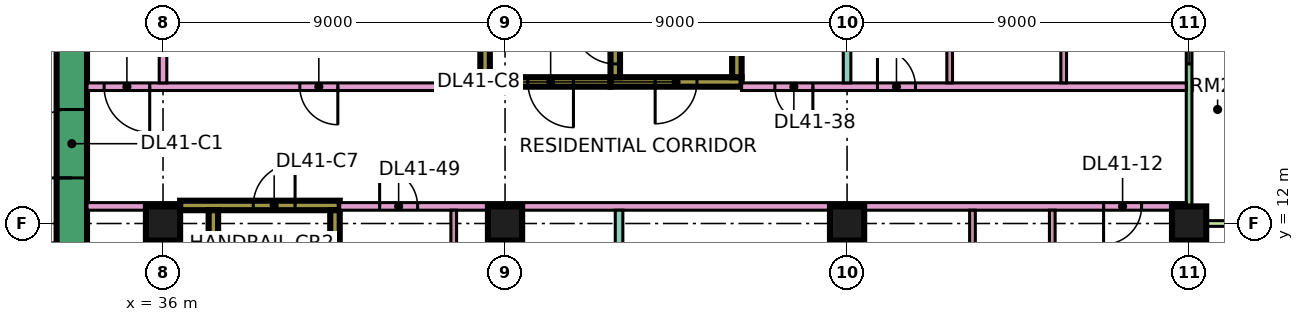
"""IFC4 building model, lengths in metres.
Left out: names, types, materials, properties, quantities, classifications, styles, units other than length and angle.
Written with IfcOpenShell. Run it as: python <this file> out.ifc"""

import sys

from ifc_helpers import new_model, si_unit, direction, frame, frame_2d, origin, origin_2d, place, context, subcontext, project, spatial, rectangle, extrude, element, fill, save


model = new_model("IFC4")
c1 = context("Model", 3, precision=1e-05, world=origin(), true_north=direction((0.0, 1.0)))
c2 = subcontext(c1, "Body", "Model", "MODEL_VIEW")
j1 = project(units=[si_unit("LENGTHUNIT", "METRE"), si_unit("PLANEANGLEUNIT", "RADIAN")], contexts=[c1])
p1 = place(None, origin())
s1 = spatial("IfcSite", under=j1, at=p1, CompositionType="ELEMENT")
p2 = place(p1, origin())
s2 = spatial("IfcBuilding", under=s1, at=p2, CompositionType="ELEMENT")
p3 = place(p2, frame((0.0, 0.0, 179.9)))
s3 = spatial("IfcBuildingStorey", under=s2, at=p3, CompositionType="ELEMENT", Elevation=179.9)
for number, where, z_axis, x_axis in (
    (1, (36.0, 12.0, 0.0), (0.0, 0.0, 1.0), (1.0, 0.0, 0.0)),
    (2, (45.0, 12.0, 0.0), (0.0, 0.0, 1.0), (1.0, 0.0, 0.0)),
    (3, (54.0, 12.0, 0.0), (0.0, 0.0, 1.0), (1.0, 0.0, 0.0)),
    (4, (63.0, 12.0, 0.0), (0.0, 0.0, 1.0), (1.0, 0.0, 0.0)),
):
    element("IfcColumn", number, at=place(p3, frame(where, z_axis=z_axis, x_axis=x_axis)), inside=s3, PredefinedType="COLUMN", context=c2, shape_type="SweptSolid", body=[
        extrude(rectangle(XDim=0.9, YDim=0.9, at=origin_2d()), origin(), (0.0, 0.0, 1.0), 3.75),
    ])
p4 = place(p3, frame((33.6, 7.8, 0.0), z_axis=(0.0, 0.0, 1.0), x_axis=(0.0, 1.0, 0.0)))
e5 = element("IfcWall", 5, at=p4, inside=s3, PredefinedType="SHEAR", context=c2, shape_type="SweptSolid", body=[
    extrude(rectangle(XDim=11.4, YDim=0.8, at=frame_2d((5.7, 0.0))), origin(), (0.0, 0.0, 1.0), 3.75),
])
p5 = place(p4, frame((5.4, 0.0, 0.0)))
e6 = element("IfcOpeningElement", 6, at=p5, cuts=e5, PredefinedType="OPENING", context=c2, shape_type="SweptSolid", body=[
    extrude(rectangle(XDim=1.8, YDim=2.4, at=frame_2d((0.9, 1.2))), frame((0.0, 0.41, 0.0), z_axis=(0.0, -1.0, 0.0), x_axis=(1.0, 0.0, 0.0)), (0.0, 0.0, 1.0), 0.82),
])
p6 = place(p3, frame((36.45, 12.475, 0.0), z_axis=(0.0, 0.0, 1.0), x_axis=(1.0, 0.0, 0.0)))
e7 = element("IfcWall", 7, at=p6, inside=s3, PredefinedType="SHEAR", context=c2, shape_type="SweptSolid", body=[
    extrude(rectangle(XDim=4.2, YDim=0.25, at=frame_2d((2.1, 0.0))), origin(), (0.0, 0.0, 1.0), 3.75),
])
p7 = place(p6, frame((1.925, 0.0, 0.0)))
e8 = element("IfcOpeningElement", 8, at=p7, cuts=e7, PredefinedType="OPENING", context=c2, shape_type="SweptSolid", body=[
    extrude(rectangle(XDim=1.1, YDim=2.2, at=frame_2d((0.55, 1.1))), frame((0.0, 0.135, 0.0), z_axis=(0.0, -1.0, 0.0), x_axis=(1.0, 0.0, 0.0)), (0.0, 0.0, 1.0), 0.27),
])
for number, where, z_axis, x_axis in (
    (9, (37.325, 5.85, 0.0), (0.0, 0.0, 1.0), (0.0, 1.0, 0.0)),
    (10, (40.525, 5.85, 0.0), (0.0, 0.0, 1.0), (0.0, 1.0, 0.0)),
):
    element("IfcWall", number, at=place(p3, frame(where, z_axis=z_axis, x_axis=x_axis)), inside=s3, PredefinedType="SHEAR", context=c2, shape_type="SweptSolid", body=[
        extrude(rectangle(XDim=6.5, YDim=0.25, at=frame_2d((3.25, 0.0))), origin(), (0.0, 0.0, 1.0), 3.75),
    ])
p8 = place(p3, frame((47.775, 15.725, 0.0), z_axis=(0.0, 0.0, 1.0), x_axis=(1.0, 0.0, 0.0)))
e11 = element("IfcWall", 11, at=p8, inside=s3, PredefinedType="SHEAR", context=c2, shape_type="SweptSolid", body=[
    extrude(rectangle(XDim=3.45, YDim=0.25, at=frame_2d((1.725, 0.0))), origin(), (0.0, 0.0, 1.0), 3.75),
])
p9 = place(p8, frame((1.175, 0.0, 0.0)))
e12 = element("IfcOpeningElement", 12, at=p9, cuts=e11, PredefinedType="OPENING", context=c2, shape_type="SweptSolid", body=[
    extrude(rectangle(XDim=1.1, YDim=2.2, at=frame_2d((0.55, 1.1))), frame((0.0, 0.135, 0.0), z_axis=(0.0, -1.0, 0.0), x_axis=(1.0, 0.0, 0.0)), (0.0, 0.0, 1.0), 0.27),
])
p10 = place(p3, frame((47.9, 15.85, 0.0), z_axis=(0.0, 0.0, 1.0), x_axis=(0.0, 1.0, 0.0)))
e13 = element("IfcWall", 13, at=p10, inside=s3, PredefinedType="SHEAR", context=c2, shape_type="SweptSolid", body=[
    extrude(rectangle(XDim=6.5, YDim=0.25, at=frame_2d((3.25, 0.0))), origin(), (0.0, 0.0, 1.0), 3.75),
])
p11 = place(p10, frame((0.35, 0.0, 0.0)))
e14 = element("IfcOpeningElement", 14, at=p11, cuts=e13, PredefinedType="OPENING", context=c2, shape_type="SweptSolid", body=[
    extrude(rectangle(XDim=1.1, YDim=2.2, at=frame_2d((0.55, 1.1))), frame((0.0, 0.135, 0.0), z_axis=(0.0, -1.0, 0.0), x_axis=(1.0, 0.0, 0.0)), (0.0, 0.0, 1.0), 0.27),
])
p12 = place(p3, frame((51.1, 15.85, 0.0), z_axis=(0.0, 0.0, 1.0), x_axis=(0.0, 1.0, 0.0)))
e15 = element("IfcWall", 15, at=p12, inside=s3, PredefinedType="SHEAR", context=c2, shape_type="SweptSolid", body=[
    extrude(rectangle(XDim=6.5, YDim=0.25, at=frame_2d((3.25, 0.0))), origin(), (0.0, 0.0, 1.0), 3.75),
])
p13 = place(p3, frame((44.35, 15.725, 0.0), z_axis=(0.0, 0.0, 1.0), x_axis=(1.0, 0.0, 0.0)))
e16 = element("IfcWall", 16, at=p13, inside=s3, PredefinedType="SHEAR", context=c2, shape_type="SweptSolid", body=[
    extrude(rectangle(XDim=3.425, YDim=0.25, at=frame_2d((1.712, 0.0))), origin(), (0.0, 0.0, 1.0), 3.75),
])
p14 = place(p13, frame((1.25, 0.0, 0.0)))
e17 = element("IfcOpeningElement", 17, at=p14, cuts=e16, PredefinedType="OPENING", context=c2, shape_type="SweptSolid", body=[
    extrude(rectangle(XDim=1.2, YDim=2.2, at=frame_2d((0.6, 1.1))), frame((0.0, 0.135, 0.0), z_axis=(0.0, -1.0, 0.0), x_axis=(1.0, 0.0, 0.0)), (0.0, 0.0, 1.0), 0.27),
])
p15 = place(p3, frame((44.475, 15.85, 0.0), z_axis=(0.0, 0.0, 1.0), x_axis=(0.0, 1.0, 0.0)))
e18 = element("IfcWall", 18, at=p15, inside=s3, PredefinedType="SHEAR", context=c2, shape_type="SweptSolid", body=[
    extrude(rectangle(XDim=6.5, YDim=0.25, at=frame_2d((3.25, 0.0))), origin(), (0.0, 0.0, 1.0), 3.75),
])
p16 = place(p15, frame((1.75, 0.0, 0.0)))
e19 = element("IfcOpeningElement", 19, at=p16, cuts=e18, PredefinedType="OPENING", context=c2, shape_type="SweptSolid", body=[
    extrude(rectangle(XDim=1.1, YDim=2.2, at=frame_2d((0.55, 1.1))), frame((0.0, 0.135, 0.0), z_axis=(0.0, -1.0, 0.0), x_axis=(1.0, 0.0, 0.0)), (0.0, 0.0, 1.0), 0.27),
])
p17 = place(p15, frame((4.3, 0.0, 0.0)))
e20 = element("IfcOpeningElement", 20, at=p17, cuts=e18, PredefinedType="OPENING", context=c2, shape_type="SweptSolid", body=[
    extrude(rectangle(XDim=1.1, YDim=2.2, at=frame_2d((0.55, 1.1))), frame((0.0, 0.135, 0.0), z_axis=(0.0, -1.0, 0.0), x_axis=(1.0, 0.0, 0.0)), (0.0, 0.0, 1.0), 0.27),
])
p18 = place(p3, frame((63.0, 12.075, 0.0), z_axis=(0.0, 0.0, 1.0), x_axis=(0.0, 1.0, 0.0)))
e21 = element("IfcWall", 21, at=p18, inside=s3, PredefinedType="SOLIDWALL", context=c2, shape_type="SweptSolid", body=[
    extrude(rectangle(XDim=10.35, YDim=0.15, at=frame_2d((5.175, 0.0))), origin(), (0.0, 0.0, 1.0), 3.35),
])
p19 = place(p18, frame((4.125, 0.0, 0.45)))
e22 = element("IfcOpeningElement", 22, at=p19, cuts=e21, PredefinedType="OPENING", context=c2, shape_type="SweptSolid", body=[
    extrude(rectangle(XDim=1.8, YDim=2.4, at=frame_2d((0.9, 1.2))), frame((0.0, 0.085, 0.0), z_axis=(0.0, -1.0, 0.0), x_axis=(1.0, 0.0, 0.0)), (0.0, 0.0, 1.0), 0.17),
])
p20 = place(p18, frame((7.538, 0.0, 0.0)))
e23 = element("IfcOpeningElement", 23, at=p20, cuts=e21, PredefinedType="OPENING", context=c2, shape_type="SweptSolid", body=[
    extrude(rectangle(XDim=1.8, YDim=2.4, at=frame_2d((0.9, 1.2))), frame((0.0, 0.085, 0.0), z_axis=(0.0, -1.0, 0.0), x_axis=(1.0, 0.0, 0.0)), (0.0, 0.0, 1.0), 0.17),
])
p21 = place(p3, frame((64.5, 12.0, 0.0), z_axis=(0.0, 0.0, 1.0), x_axis=(-1.0, 0.0, 0.0)))
e24 = element("IfcWall", 24, at=p21, inside=s3, PredefinedType="SOLIDWALL", context=c2, shape_type="SweptSolid", body=[
    extrude(rectangle(XDim=1.5, YDim=0.15, at=frame_2d((0.75, 0.0))), origin(), (0.0, 0.0, 1.0), 3.35),
])
p22 = place(p3, frame((34.0, 12.45, 0.0), z_axis=(0.0, 0.0, 1.0), x_axis=(1.0, 0.0, 0.0)))
e25 = element("IfcWall", 25, at=p22, inside=s3, PredefinedType="PARTITIONING", context=c2, shape_type="SweptSolid", body=[
    extrude(rectangle(XDim=2.451, YDim=0.2, at=frame_2d((1.226, 0.0))), origin(), (0.0, 0.0, 1.0), 3.35),
])
p23 = place(p3, frame((34.0, 15.6, 0.0), z_axis=(0.0, 0.0, 1.0), x_axis=(1.0, 0.0, 0.0)))
e26 = element("IfcWall", 26, at=p23, inside=s3, PredefinedType="PARTITIONING", context=c2, shape_type="SweptSolid", body=[
    extrude(rectangle(XDim=10.35, YDim=0.2, at=frame_2d((5.175, 0.0))), origin(), (0.0, 0.0, 1.0), 3.35),
])
p24 = place(p23, frame((5.6, 0.0, 0.0)))
e27 = element("IfcOpeningElement", 27, at=p24, cuts=e26, PredefinedType="OPENING", context=c2, shape_type="SweptSolid", body=[
    extrude(rectangle(XDim=1.0, YDim=2.1, at=frame_2d((0.5, 1.05))), frame((0.0, 0.11, 0.0), z_axis=(0.0, -1.0, 0.0), x_axis=(1.0, 0.0, 0.0)), (0.0, 0.0, 1.0), 0.22),
])
p25 = place(p23, frame((0.45, 0.0, 0.0)))
e28 = element("IfcOpeningElement", 28, at=p25, cuts=e26, PredefinedType="OPENING", context=c2, shape_type="SweptSolid", body=[
    extrude(rectangle(XDim=1.2, YDim=2.1, at=frame_2d((0.6, 1.05))), frame((0.0, 0.11, 0.0), z_axis=(0.0, -1.0, 0.0), x_axis=(1.0, 0.0, 0.0)), (0.0, 0.0, 1.0), 0.22),
])
p26 = place(p3, frame((36.0, 15.7, 0.0), z_axis=(0.0, 0.0, 1.0), x_axis=(0.0, 1.0, 0.0)))
e29 = element("IfcWall", 29, at=p26, inside=s3, PredefinedType="PARTITIONING", context=c2, shape_type="SweptSolid", body=[
    extrude(rectangle(XDim=8.3, YDim=0.2, at=frame_2d((4.15, 0.0))), origin(), (0.0, 0.0, 1.0), 3.35),
])
p27 = place(p3, frame((40.65, 12.45, 0.0), z_axis=(0.0, 0.0, 1.0), x_axis=(1.0, 0.0, 0.0)))
e30 = element("IfcWall", 30, at=p27, inside=s3, PredefinedType="PARTITIONING", context=c2, shape_type="SweptSolid", body=[
    extrude(rectangle(XDim=22.276, YDim=0.2, at=frame_2d((11.138, 0.0))), origin(), (0.0, 0.0, 1.0), 3.35),
])
p28 = place(p27, frame((20.1, 0.0, 0.0)))
e31 = element("IfcOpeningElement", 31, at=p28, cuts=e30, PredefinedType="OPENING", context=c2, shape_type="SweptSolid", body=[
    extrude(rectangle(XDim=1.0, YDim=2.1, at=frame_2d((0.5, 1.05))), frame((0.0, 0.11, 0.0), z_axis=(0.0, -1.0, 0.0), x_axis=(1.0, 0.0, 0.0)), (0.0, 0.0, 1.0), 0.22),
])
p29 = place(p27, frame((1.05, 0.0, 0.0)))
e32 = element("IfcOpeningElement", 32, at=p29, cuts=e30, PredefinedType="OPENING", context=c2, shape_type="SweptSolid", body=[
    extrude(rectangle(XDim=1.0, YDim=2.1, at=frame_2d((0.5, 1.05))), frame((0.0, 0.11, 0.0), z_axis=(0.0, -1.0, 0.0), x_axis=(1.0, 0.0, 0.0)), (0.0, 0.0, 1.0), 0.22),
])
p30 = place(p3, frame((43.65, 5.825, 0.0), z_axis=(0.0, 0.0, 1.0), x_axis=(0.0, 1.0, 0.0)))
e33 = element("IfcWall", 33, at=p30, inside=s3, PredefinedType="PARTITIONING", context=c2, shape_type="SweptSolid", body=[
    extrude(rectangle(XDim=6.525, YDim=0.15, at=frame_2d((3.263, 0.0))), origin(), (0.0, 0.0, 1.0), 3.35),
])
p31 = place(p30, frame((4.425, 0.0, 0.0)))
e34 = element("IfcOpeningElement", 34, at=p31, cuts=e33, PredefinedType="OPENING", context=c2, shape_type="SweptSolid", body=[
    extrude(rectangle(XDim=0.9, YDim=2.1, at=frame_2d((0.45, 1.05))), frame((0.0, 0.085, 0.0), z_axis=(0.0, -1.0, 0.0), x_axis=(1.0, 0.0, 0.0)), (0.0, 0.0, 1.0), 0.17),
])
p32 = place(p3, frame((48.0, 5.825, 0.0), z_axis=(0.0, 0.0, 1.0), x_axis=(0.0, 1.0, 0.0)))
e35 = element("IfcWall", 35, at=p32, inside=s3, PredefinedType="PARTITIONING", context=c2, shape_type="SweptSolid", body=[
    extrude(rectangle(XDim=6.525, YDim=0.2, at=frame_2d((3.263, 0.0))), origin(), (0.0, 0.0, 1.0), 3.35),
])
p33 = place(p3, frame((51.225, 15.6, 0.0), z_axis=(0.0, 0.0, 1.0), x_axis=(1.0, 0.0, 0.0)))
e36 = element("IfcWall", 36, at=p33, inside=s3, PredefinedType="PARTITIONING", context=c2, shape_type="SweptSolid", body=[
    extrude(rectangle(XDim=11.701, YDim=0.2, at=frame_2d((5.851, 0.0))), origin(), (0.0, 0.0, 1.0), 3.35),
])
p34 = place(p33, frame((3.575, 0.0, 0.0)))
e37 = element("IfcOpeningElement", 37, at=p34, cuts=e36, PredefinedType="OPENING", context=c2, shape_type="SweptSolid", body=[
    extrude(rectangle(XDim=1.0, YDim=2.1, at=frame_2d((0.5, 1.05))), frame((0.0, 0.11, 0.0), z_axis=(0.0, -1.0, 0.0), x_axis=(1.0, 0.0, 0.0)), (0.0, 0.0, 1.0), 0.22),
])
p35 = place(p33, frame((0.875, 0.0, 0.0)))
e38 = element("IfcOpeningElement", 38, at=p35, cuts=e36, PredefinedType="OPENING", context=c2, shape_type="SweptSolid", body=[
    extrude(rectangle(XDim=1.0, YDim=2.1, at=frame_2d((0.5, 1.05))), frame((0.0, 0.11, 0.0), z_axis=(0.0, -1.0, 0.0), x_axis=(1.0, 0.0, 0.0)), (0.0, 0.0, 1.0), 0.22),
])
p36 = place(p3, frame((54.0, 7.125, 0.0), z_axis=(0.0, 0.0, 1.0), x_axis=(0.0, 1.0, 0.0)))
e39 = element("IfcWall", 39, at=p36, inside=s3, PredefinedType="PARTITIONING", context=c2, shape_type="SweptSolid", body=[
    extrude(rectangle(XDim=5.225, YDim=0.15, at=frame_2d((2.613, 0.0))), origin(), (0.0, 0.0, 1.0), 3.35),
])
p37 = place(p3, frame((54.0, 15.7, 0.0), z_axis=(0.0, 0.0, 1.0), x_axis=(0.0, 1.0, 0.0)))
e40 = element("IfcWall", 40, at=p37, inside=s3, PredefinedType="PARTITIONING", context=c2, shape_type="SweptSolid", body=[
    extrude(rectangle(XDim=8.3, YDim=0.2, at=frame_2d((4.15, 0.0))), origin(), (0.0, 0.0, 1.0), 3.35),
])
p38 = place(p3, frame((56.7, 15.7, 0.0), z_axis=(0.0, 0.0, 1.0), x_axis=(0.0, 1.0, 0.0)))
e41 = element("IfcWall", 41, at=p38, inside=s3, PredefinedType="PARTITIONING", context=c2, shape_type="SweptSolid", body=[
    extrude(rectangle(XDim=2.825, YDim=0.15, at=frame_2d((1.413, 0.0))), origin(), (0.0, 0.0, 1.0), 3.35),
])
for number, where, z_axis, x_axis in (
    (42, (57.3, 7.125, 0.0), (0.0, 0.0, 1.0), (0.0, 1.0, 0.0)),
    (43, (59.4, 7.125, 0.0), (0.0, 0.0, 1.0), (0.0, 1.0, 0.0)),
):
    element("IfcWall", number, at=place(p3, frame(where, z_axis=z_axis, x_axis=x_axis)), inside=s3, PredefinedType="PARTITIONING", context=c2, shape_type="SweptSolid", body=[
        extrude(rectangle(XDim=5.225, YDim=0.15, at=frame_2d((2.613, 0.0))), origin(), (0.0, 0.0, 1.0), 3.35),
    ])
p39 = place(p3, frame((59.7, 15.7, 0.0), z_axis=(0.0, 0.0, 1.0), x_axis=(0.0, 1.0, 0.0)))
e44 = element("IfcWall", 44, at=p39, inside=s3, PredefinedType="PARTITIONING", context=c2, shape_type="SweptSolid", body=[
    extrude(rectangle(XDim=2.825, YDim=0.15, at=frame_2d((1.413, 0.0))), origin(), (0.0, 0.0, 1.0), 3.35),
])
p40 = place(p19, origin())
e45 = element("IfcWindow", 45, at=p40, inside=s3, PartitioningType="SINGLE_PANEL", PredefinedType="WINDOW", context=c2, shape_type="SweptSolid", body=[
    extrude(rectangle(XDim=1.8, YDim=2.4, at=frame_2d((0.9, 1.2))), frame((0.0, 0.03, 0.0), z_axis=(0.0, -1.0, 0.0), x_axis=(1.0, 0.0, 0.0)), (0.0, 0.0, 1.0), 0.06),
])
fill(e22, e45)
p41 = place(p5, origin())
e46 = element("IfcDoor", 46, at=p41, inside=s3, OperationType="DOUBLE_DOOR_SINGLE_SWING", PredefinedType="DOOR", context=c2, shape_type="SweptSolid", body=[
    extrude(rectangle(XDim=1.8, YDim=2.4, at=frame_2d((0.9, 1.2))), frame((0.0, 0.025, 0.0), z_axis=(0.0, -1.0, 0.0), x_axis=(1.0, 0.0, 0.0)), (0.0, 0.0, 1.0), 0.05),
])
fill(e6, e46)
p42 = place(p7, frame((1.1, 0.0, 0.0), z_axis=(0.0, 0.0, 1.0), x_axis=(-1.0, 0.0, 0.0)))
e47 = element("IfcDoor", 47, at=p42, inside=s3, OperationType="SINGLE_SWING_RIGHT", PredefinedType="DOOR", context=c2, shape_type="SweptSolid", body=[
    extrude(rectangle(XDim=1.1, YDim=2.2, at=frame_2d((0.55, 1.1))), frame((0.0, 0.025, 0.0), z_axis=(0.0, -1.0, 0.0), x_axis=(1.0, 0.0, 0.0)), (0.0, 0.0, 1.0), 0.05),
])
fill(e8, e47)
p43 = place(p9, frame((1.1, 0.0, 0.0), z_axis=(0.0, 0.0, 1.0), x_axis=(-1.0, 0.0, 0.0)))
e48 = element("IfcDoor", 48, at=p43, inside=s3, OperationType="SINGLE_SWING_LEFT", PredefinedType="DOOR", context=c2, shape_type="SweptSolid", body=[
    extrude(rectangle(XDim=1.1, YDim=2.2, at=frame_2d((0.55, 1.1))), frame((0.0, 0.025, 0.0), z_axis=(0.0, -1.0, 0.0), x_axis=(1.0, 0.0, 0.0)), (0.0, 0.0, 1.0), 0.05),
])
fill(e12, e48)
p44 = place(p14, origin())
e49 = element("IfcDoor", 49, at=p44, inside=s3, OperationType="SINGLE_SWING_RIGHT", PredefinedType="DOOR", context=c2, shape_type="SweptSolid", body=[
    extrude(rectangle(XDim=1.2, YDim=2.2, at=frame_2d((0.6, 1.1))), frame((0.0, 0.025, 0.0), z_axis=(0.0, -1.0, 0.0), x_axis=(1.0, 0.0, 0.0)), (0.0, 0.0, 1.0), 0.05),
])
fill(e17, e49)
p45 = place(p11, frame((1.1, 0.0, 0.0), z_axis=(0.0, 0.0, 1.0), x_axis=(-1.0, 0.0, 0.0)))
e50 = element("IfcDoor", 50, at=p45, inside=s3, OperationType="SINGLE_SWING_RIGHT", PredefinedType="DOOR", context=c2, shape_type="SweptSolid", body=[
    extrude(rectangle(XDim=1.1, YDim=2.2, at=frame_2d((0.55, 1.1))), frame((0.0, 0.025, 0.0), z_axis=(0.0, -1.0, 0.0), x_axis=(1.0, 0.0, 0.0)), (0.0, 0.0, 1.0), 0.05),
])
fill(e14, e50)
p46 = place(p24, origin())
e51 = element("IfcDoor", 51, at=p46, inside=s3, OperationType="SINGLE_SWING_RIGHT", PredefinedType="DOOR", context=c2, shape_type="SweptSolid", body=[
    extrude(rectangle(XDim=1.0, YDim=2.1, at=frame_2d((0.5, 1.05))), frame((0.0, 0.025, 0.0), z_axis=(0.0, -1.0, 0.0), x_axis=(1.0, 0.0, 0.0)), (0.0, 0.0, 1.0), 0.05),
])
fill(e27, e51)
p47 = place(p34, origin())
e52 = element("IfcDoor", 52, at=p47, inside=s3, OperationType="SINGLE_SWING_LEFT", PredefinedType="DOOR", context=c2, shape_type="SweptSolid", body=[
    extrude(rectangle(XDim=1.0, YDim=2.1, at=frame_2d((0.5, 1.05))), frame((0.0, 0.025, 0.0), z_axis=(0.0, -1.0, 0.0), x_axis=(1.0, 0.0, 0.0)), (0.0, 0.0, 1.0), 0.05),
])
fill(e37, e52)
p48 = place(p28, frame((1.0, 0.0, 0.0), z_axis=(0.0, 0.0, 1.0), x_axis=(-1.0, 0.0, 0.0)))
e53 = element("IfcDoor", 53, at=p48, inside=s3, OperationType="SINGLE_SWING_LEFT", PredefinedType="DOOR", context=c2, shape_type="SweptSolid", body=[
    extrude(rectangle(XDim=1.0, YDim=2.1, at=frame_2d((0.5, 1.05))), frame((0.0, 0.025, 0.0), z_axis=(0.0, -1.0, 0.0), x_axis=(1.0, 0.0, 0.0)), (0.0, 0.0, 1.0), 0.05),
])
fill(e31, e53)
p49 = place(p25, origin())
e54 = element("IfcDoor", 54, at=p49, inside=s3, OperationType="SINGLE_SWING_RIGHT", PredefinedType="DOOR", context=c2, shape_type="SweptSolid", body=[
    extrude(rectangle(XDim=1.2, YDim=2.1, at=frame_2d((0.6, 1.05))), frame((0.0, 0.025, 0.0), z_axis=(0.0, -1.0, 0.0), x_axis=(1.0, 0.0, 0.0)), (0.0, 0.0, 1.0), 0.05),
])
fill(e28, e54)
p50 = place(p35, origin())
e55 = element("IfcDoor", 55, at=p50, inside=s3, OperationType="SINGLE_SWING_RIGHT", PredefinedType="DOOR", context=c2, shape_type="SweptSolid", body=[
    extrude(rectangle(XDim=1.0, YDim=2.1, at=frame_2d((0.5, 1.05))), frame((0.0, 0.025, 0.0), z_axis=(0.0, -1.0, 0.0), x_axis=(1.0, 0.0, 0.0)), (0.0, 0.0, 1.0), 0.05),
])
fill(e38, e55)
p51 = place(p29, origin())
e56 = element("IfcDoor", 56, at=p51, inside=s3, OperationType="SINGLE_SWING_LEFT", PredefinedType="DOOR", context=c2, shape_type="SweptSolid", body=[
    extrude(rectangle(XDim=1.0, YDim=2.1, at=frame_2d((0.5, 1.05))), frame((0.0, 0.025, 0.0), z_axis=(0.0, -1.0, 0.0), x_axis=(1.0, 0.0, 0.0)), (0.0, 0.0, 1.0), 0.05),
])
fill(e32, e56)
save(model, sys.argv[1])
